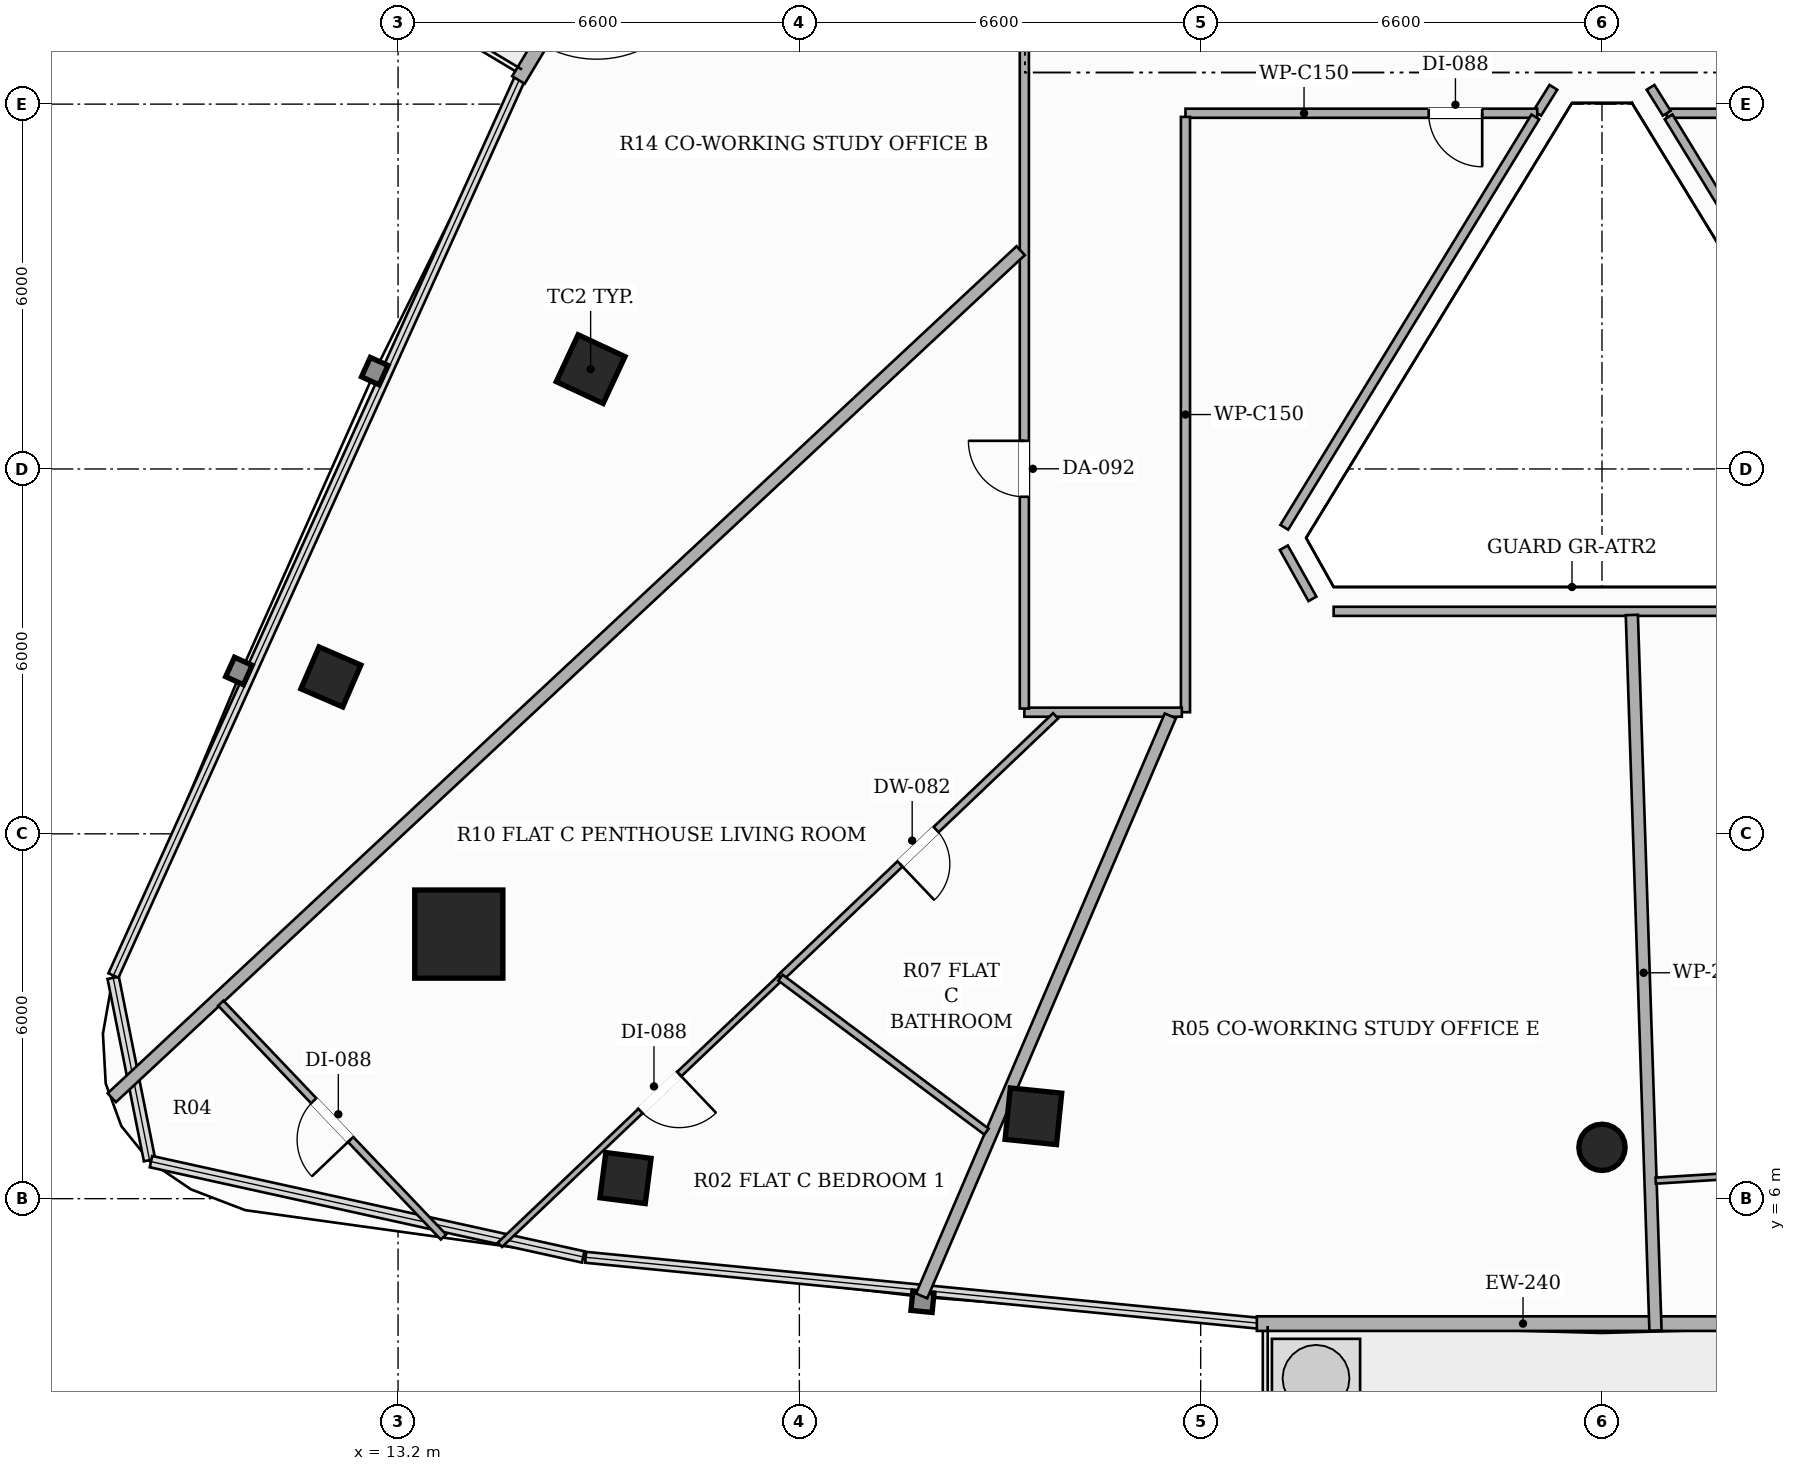
"""IFC4 building model, lengths in metres.
Left out: names, types, materials, properties, quantities, classifications, styles, units other than length and angle.
Written with IfcOpenShell. Run it as: python <this file> out.ifc"""

import sys

from ifc_helpers import new_model, si_unit, direction, frame, frame_2d, origin, origin_2d, place, context, subcontext, project, spatial, rectangle, hollow_rectangle, hollow_circle, extrude, element, fill, save


model = new_model("IFC4")
c1 = context("Model", 3, precision=1e-05, world=origin(), true_north=direction((0.0, 1.0)))
c2 = subcontext(c1, "Body", "Model", "MODEL_VIEW")
j1 = project(units=[si_unit("LENGTHUNIT", "METRE"), si_unit("PLANEANGLEUNIT", "RADIAN")], contexts=[c1])
p1 = place(None, origin())
s1 = spatial("IfcSite", under=j1, at=p1, CompositionType="ELEMENT")
p2 = place(p1, origin())
s2 = spatial("IfcBuilding", under=s1, at=p2, CompositionType="ELEMENT")
p3 = place(p2, frame((0.0, 0.0, 170.45)))
s3 = spatial("IfcBuildingStorey", under=s2, at=p3, CompositionType="ELEMENT", Elevation=170.45)
p4 = place(p3, frame((14.199, 10.351, 0.0), z_axis=(0.0, 0.0, 1.0), x_axis=(1.0, 0.0, 0.0)))
e1 = element("IfcColumn", 1, at=p4, inside=s3, PredefinedType="COLUMN", context=c2, shape_type="SweptSolid", body=[
    extrude(hollow_rectangle(XDim=1.45, YDim=1.45, WallThickness=0.045, at=origin_2d()), origin(), (0.0, 0.0, 1.0), 3.3),
])
for number, where, z_axis, x_axis in (
    (2, (16.367, 19.642, 0.0), (0.0, 0.0, 1.0), (0.423, 0.906, 0.0)),
    (3, (23.649, 7.355, 0.0), (0.0, 0.0, 1.0), (-0.995, 0.101, 0.0)),
):
    element("IfcColumn", number, at=place(p3, frame(where, z_axis=z_axis, x_axis=x_axis)), inside=s3, PredefinedType="COLUMN", context=c2, shape_type="SweptSolid", body=[
        extrude(hollow_rectangle(XDim=0.85, YDim=0.85, WallThickness=0.028, at=origin_2d()), origin(), (0.0, 0.0, 1.0), 3.3),
    ])
p5 = place(p3, frame((33.0, 6.844, 0.0), z_axis=(0.0, 0.0, 1.0), x_axis=(1.0, 0.0, 0.0)))
e4 = element("IfcColumn", 4, at=p5, inside=s3, PredefinedType="COLUMN", context=c2, shape_type="SweptSolid", body=[
    extrude(hollow_circle(Radius=0.381, WallThickness=0.022, at=origin_2d()), origin(), (0.0, 0.0, 1.0), 3.3),
])
for number, where, z_axis, x_axis in (
    (5, (12.095, 14.58, 0.0), (0.0, 0.0, 1.0), (0.397, 0.918, 0.0)),
    (6, (16.941, 6.339, 0.0), (0.0, 0.0, 1.0), (-0.992, 0.127, 0.0)),
):
    element("IfcColumn", number, at=place(p3, frame(where, z_axis=z_axis, x_axis=x_axis)), inside=s3, PredefinedType="COLUMN", context=c2, shape_type="SweptSolid", body=[
        extrude(hollow_rectangle(XDim=0.75, YDim=0.75, WallThickness=0.025, at=origin_2d()), origin(), (0.0, 0.0, 1.0), 3.3),
    ])
p6 = place(p3, frame((20.826, 33.811, 0.0), z_axis=(0.0, 0.0, 1.0), x_axis=(-0.514332213488, -0.857591029669, 0.0)))
e7 = element("IfcWall", 7, at=p6, inside=s3, PredefinedType="SOLIDWALL", context=c2, shape_type="SweptSolid", body=[
    extrude(rectangle(XDim=10.977, YDim=0.24, at=frame_2d((5.489, 0.0))), origin(), (0.0, 0.0, 1.0), 2.624),
])
p7 = place(p6, frame((8.48, 0.0, 0.0)))
e8 = element("IfcOpeningElement", 8, at=p7, cuts=e7, PredefinedType="OPENING", context=c2, shape_type="SweptSolid", body=[
    extrude(rectangle(XDim=1.8, YDim=2.2, at=frame_2d((0.9, 1.1))), frame((0.0, 0.13, 0.0), z_axis=(0.0, -1.0, 0.0), x_axis=(1.0, 0.0, 0.0)), (0.0, 0.0, 1.0), 0.26),
])
p8 = place(p3, frame((27.324, 3.945, 0.0), z_axis=(0.0, 0.0, 1.0), x_axis=(1.0, 0.0, 0.0)))
e9 = element("IfcWall", 9, at=p8, inside=s3, PredefinedType="SOLIDWALL", context=c2, shape_type="SweptSolid", body=[
    extrude(rectangle(XDim=11.352, YDim=0.24, at=frame_2d((5.676, 0.0))), origin(), (0.0, 0.0, 1.0), 2.624),
])
p9 = place(p8, frame((8.855, 0.0, 0.0)))
e10 = element("IfcOpeningElement", 10, at=p9, cuts=e9, PredefinedType="OPENING", context=c2, shape_type="SweptSolid", body=[
    extrude(rectangle(XDim=1.8, YDim=2.2, at=frame_2d((0.9, 1.1))), frame((0.0, 0.13, 0.0), z_axis=(0.0, -1.0, 0.0), x_axis=(1.0, 0.0, 0.0)), (0.0, 0.0, 1.0), 0.26),
])
p10 = place(p3, frame((32.201, 24.276, 0.0), z_axis=(0.0, 0.0, 1.0), x_axis=(-0.529649150849, -0.84821682193, 0.0)))
e11 = element("IfcWall", 11, at=p10, inside=s3, PredefinedType="PARTITIONING", context=c2, shape_type="SweptSolid", body=[
    extrude(rectangle(XDim=0.502, YDim=0.15, at=frame_2d((0.251, 0.0))), origin(), (0.0, 0.0, 1.0), 3.06),
])
p11 = place(p3, frame((31.935, 23.85, 0.0), z_axis=(0.0, 0.0, 1.0), x_axis=(-1.0, 0.0, 0.0)))
e12 = element("IfcWall", 12, at=p11, inside=s3, PredefinedType="PARTITIONING", context=c2, shape_type="SweptSolid", body=[
    extrude(rectangle(XDim=5.785, YDim=0.15, at=frame_2d((2.893, 0.0))), origin(), (0.0, 0.0, 1.0), 2.721),
])
p12 = place(p11, frame((0.905, 0.0, 0.0)))
e13 = element("IfcOpeningElement", 13, at=p12, cuts=e12, PredefinedType="OPENING", context=c2, shape_type="SweptSolid", body=[
    extrude(rectangle(XDim=0.88, YDim=2.1, at=frame_2d((0.44, 1.05))), frame((0.0, 0.085, 0.0), z_axis=(0.0, -1.0, 0.0), x_axis=(1.0, 0.0, 0.0)), (0.0, 0.0, 1.0), 0.17),
])
p13 = place(p3, frame((26.15, 23.79, 0.0), z_axis=(0.0, 0.0, 1.0), x_axis=(0.0, -1.0, 0.0)))
e14 = element("IfcWall", 14, at=p13, inside=s3, PredefinedType="PARTITIONING", context=c2, shape_type="SweptSolid", body=[
    extrude(rectangle(XDim=9.79, YDim=0.15, at=frame_2d((4.895, 0.0))), origin(), (0.0, 0.0, 1.0), 2.721),
])
p14 = place(p3, frame((26.09, 14.0, 0.0), z_axis=(0.0, 0.0, 1.0), x_axis=(-1.0, 0.0, 0.0)))
e15 = element("IfcWall", 15, at=p14, inside=s3, PredefinedType="PARTITIONING", context=c2, shape_type="SweptSolid", body=[
    extrude(rectangle(XDim=2.59, YDim=0.15, at=frame_2d((1.295, 0.0))), origin(), (0.0, 0.0, 1.0), 2.721),
])
p15 = place(p3, frame((23.5, 14.06, 0.0), z_axis=(0.0, 0.0, 1.0), x_axis=(0.0, 1.0, 0.0)))
e16 = element("IfcWall", 16, at=p15, inside=s3, PredefinedType="PARTITIONING", context=c2, shape_type="SweptSolid", body=[
    extrude(rectangle(XDim=23.457, YDim=0.15, at=frame_2d((11.729, 0.0))), origin(), (0.0, 0.0, 1.0), 2.413),
])
p16 = place(p15, frame((14.586, 0.0, 0.0)))
e17 = element("IfcOpeningElement", 17, at=p16, cuts=e16, PredefinedType="OPENING", context=c2, shape_type="SweptSolid", body=[
    extrude(rectangle(XDim=0.88, YDim=2.1, at=frame_2d((0.44, 1.05))), frame((0.0, 0.085, 0.0), z_axis=(0.0, -1.0, 0.0), x_axis=(1.0, 0.0, 0.0)), (0.0, 0.0, 1.0), 0.17),
])
p17 = place(p15, frame((3.483, 0.0, 0.0)))
e18 = element("IfcOpeningElement", 18, at=p17, cuts=e16, PredefinedType="OPENING", context=c2, shape_type="SweptSolid", body=[
    extrude(rectangle(XDim=0.92, YDim=2.15, at=frame_2d((0.46, 1.075))), frame((0.0, 0.085, 0.0), z_axis=(0.0, -1.0, 0.0), x_axis=(1.0, 0.0, 0.0)), (0.0, 0.0, 1.0), 0.17),
])
p18 = place(p3, frame((42.29, 23.85, 0.0), z_axis=(0.0, 0.0, 1.0), x_axis=(-1.0, 0.0, 0.0)))
e19 = element("IfcWall", 19, at=p18, inside=s3, PredefinedType="PARTITIONING", context=c2, shape_type="SweptSolid", body=[
    extrude(rectangle(XDim=8.225, YDim=0.15, at=frame_2d((4.113, 0.0))), origin(), (0.0, 0.0, 1.0), 2.492),
])
p19 = place(p18, frame((5.493, 0.0, 0.0)))
e20 = element("IfcOpeningElement", 20, at=p19, cuts=e19, PredefinedType="OPENING", context=c2, shape_type="SweptSolid", body=[
    extrude(rectangle(XDim=0.92, YDim=2.15, at=frame_2d((0.46, 1.075))), frame((0.0, 0.085, 0.0), z_axis=(0.0, -1.0, 0.0), x_axis=(1.0, 0.0, 0.0)), (0.0, 0.0, 1.0), 0.17),
])
p20 = place(p18, frame((2.43, 0.0, 0.0)))
e21 = element("IfcOpeningElement", 21, at=p20, cuts=e19, PredefinedType="OPENING", context=c2, shape_type="SweptSolid", body=[
    extrude(rectangle(XDim=0.82, YDim=2.1, at=frame_2d((0.41, 1.05))), frame((0.0, 0.085, 0.0), z_axis=(0.0, -1.0, 0.0), x_axis=(1.0, 0.0, 0.0)), (0.0, 0.0, 1.0), 0.17),
])
p21 = place(p18, frame((0.14, 0.0, 0.0)))
e22 = element("IfcOpeningElement", 22, at=p21, cuts=e19, PredefinedType="OPENING", context=c2, shape_type="SweptSolid", body=[
    extrude(rectangle(XDim=0.88, YDim=2.1, at=frame_2d((0.44, 1.05))), frame((0.0, 0.085, 0.0), z_axis=(0.0, -1.0, 0.0), x_axis=(1.0, 0.0, 0.0)), (0.0, 0.0, 1.0), 0.17),
])
p22 = place(p3, frame((34.065, 23.85, 0.0), z_axis=(0.0, 0.0, 1.0), x_axis=(-0.529649150849, 0.84821682193, 0.0)))
e23 = element("IfcWall", 23, at=p22, inside=s3, PredefinedType="PARTITIONING", context=c2, shape_type="SweptSolid", body=[
    extrude(rectangle(XDim=0.502, YDim=0.15, at=frame_2d((0.251, 0.0))), origin(), (0.0, 0.0, 1.0), 3.06),
])
p23 = place(p3, frame((34.096, 23.79, 0.0), z_axis=(0.0, 0.0, 1.0), x_axis=(0.521886794995, -0.853014755564, 0.0)))
e24 = element("IfcWall", 24, at=p23, inside=s3, PredefinedType="PARTITIONING", context=c2, shape_type="SweptSolid", body=[
    extrude(rectangle(XDim=7.912, YDim=0.15, at=frame_2d((3.956, 0.0))), origin(), (0.0, 0.0, 1.0), 2.721),
])
p24 = place(p3, frame((37.413, 15.659, 0.0), z_axis=(0.0, 0.0, 1.0), x_axis=(-1.0, 0.0, 0.0)))
e25 = element("IfcWall", 25, at=p24, inside=s3, PredefinedType="PARTITIONING", context=c2, shape_type="SweptSolid", body=[
    extrude(rectangle(XDim=8.826, YDim=0.15, at=frame_2d((4.413, 0.0))), origin(), (0.0, 0.0, 1.0), 2.721),
])
p25 = place(p3, frame((28.238, 15.864, 0.0), z_axis=(0.0, 0.0, 1.0), x_axis=(-0.48779296069, 0.872959350429, 0.0)))
e26 = element("IfcWall", 26, at=p25, inside=s3, PredefinedType="PARTITIONING", context=c2, shape_type="SweptSolid", body=[
    extrude(rectangle(XDim=0.963, YDim=0.15, at=frame_2d((0.482, 0.0))), origin(), (0.0, 0.0, 1.0), 3.06),
])
p26 = place(p3, frame((27.775, 17.041, 0.0), z_axis=(0.0, 0.0, 1.0), x_axis=(0.521886794995, 0.853014755564, 0.0)))
e27 = element("IfcWall", 27, at=p26, inside=s3, PredefinedType="PARTITIONING", context=c2, shape_type="SweptSolid", body=[
    extrude(rectangle(XDim=7.912, YDim=0.15, at=frame_2d((3.956, 0.0))), origin(), (0.0, 0.0, 1.0), 2.721),
])
p27 = place(p3, frame((33.88, 3.831, 0.0), z_axis=(0.0, 0.0, 1.0), x_axis=(-0.033030388285, 0.999454347857, 0.0)))
e28 = element("IfcWall", 28, at=p27, inside=s3, PredefinedType="PARTITIONING", context=c2, shape_type="SweptSolid", body=[
    extrude(rectangle(XDim=11.774, YDim=0.2, at=frame_2d((5.887, 0.0))), origin(), (0.0, 0.0, 1.0), 2.413),
])
p28 = place(p3, frame((23.44, 21.59, 0.0), z_axis=(0.0, 0.0, 1.0), x_axis=(-0.731574776166, -0.681761209572, 0.0)))
e29 = element("IfcWall", 29, at=p28, inside=s3, PredefinedType="PARTITIONING", context=c2, shape_type="SweptSolid", body=[
    extrude(rectangle(XDim=20.433, YDim=0.2, at=frame_2d((10.216, 0.0))), origin(), (0.0, 0.0, 1.0), 2.413),
])
p29 = place(p3, frame((25.901, 13.94, 0.0), z_axis=(0.0, 0.0, 1.0), x_axis=(-0.394055564824, -0.919086618242, 0.0)))
e30 = element("IfcWall", 30, at=p29, inside=s3, PredefinedType="PARTITIONING", context=c2, shape_type="SweptSolid", body=[
    extrude(rectangle(XDim=10.379, YDim=0.2, at=frame_2d((5.189, 0.0))), origin(), (0.0, 0.0, 1.0), 2.413),
])
p30 = place(p3, frame((41.446, 6.77, 0.0), z_axis=(0.0, 0.0, 1.0), x_axis=(-0.998040272182, -0.062574875979, 0.0)))
e31 = element("IfcWall", 31, at=p30, inside=s3, PredefinedType="PARTITIONING", context=c2, shape_type="SweptSolid", body=[
    extrude(rectangle(XDim=7.577, YDim=0.1, at=frame_2d((3.789, 0.0))), origin(), (0.0, 0.0, 1.0), 3.06),
])
p31 = place(p30, frame((3.378, 0.0, 0.0)))
e32 = element("IfcOpeningElement", 32, at=p31, cuts=e31, PredefinedType="OPENING", context=c2, shape_type="SweptSolid", body=[
    extrude(rectangle(XDim=0.82, YDim=2.1, at=frame_2d((0.41, 1.05))), frame((0.0, 0.06, 0.0), z_axis=(0.0, -1.0, 0.0), x_axis=(1.0, 0.0, 0.0)), (0.0, 0.0, 1.0), 0.12),
])
p32 = place(p3, frame((24.014, 13.94, 0.0), z_axis=(0.0, 0.0, 1.0), x_axis=(-0.724345202964, -0.68943747138, 0.0)))
e33 = element("IfcWall", 33, at=p32, inside=s3, PredefinedType="PARTITIONING", context=c2, shape_type="SweptSolid", body=[
    extrude(rectangle(XDim=6.246, YDim=0.12, at=frame_2d((3.123, 0.0))), origin(), (0.0, 0.0, 1.0), 2.721),
])
p33 = place(p32, frame((2.713, 0.0, 0.0)))
e34 = element("IfcOpeningElement", 34, at=p33, cuts=e33, PredefinedType="OPENING", context=c2, shape_type="SweptSolid", body=[
    extrude(rectangle(XDim=0.82, YDim=2.1, at=frame_2d((0.41, 1.05))), frame((0.0, 0.07, 0.0), z_axis=(0.0, -1.0, 0.0), x_axis=(1.0, 0.0, 0.0)), (0.0, 0.0, 1.0), 0.14),
])
p34 = place(p3, frame((13.947, 5.369, 0.0), z_axis=(0.0, 0.0, 1.0), x_axis=(-0.689563334415, 0.724225384691, 0.0)))
e35 = element("IfcWall", 35, at=p34, inside=s3, PredefinedType="PARTITIONING", context=c2, shape_type="SweptSolid", body=[
    extrude(rectangle(XDim=5.311, YDim=0.12, at=frame_2d((2.655, 0.0))), origin(), (0.0, 0.0, 1.0), 3.06),
])
p35 = place(p34, frame((2.215, 0.0, 0.0)))
e36 = element("IfcOpeningElement", 36, at=p35, cuts=e35, PredefinedType="OPENING", context=c2, shape_type="SweptSolid", body=[
    extrude(rectangle(XDim=0.88, YDim=2.1, at=frame_2d((0.44, 1.05))), frame((0.0, 0.07, 0.0), z_axis=(0.0, -1.0, 0.0), x_axis=(1.0, 0.0, 0.0)), (0.0, 0.0, 1.0), 0.14),
])
p36 = place(p3, frame((19.49, 9.634, 0.0), z_axis=(0.0, 0.0, 1.0), x_axis=(-0.724311078703, -0.68947332165, 0.0)))
e37 = element("IfcWall", 37, at=p36, inside=s3, PredefinedType="PARTITIONING", context=c2, shape_type="SweptSolid", body=[
    extrude(rectangle(XDim=6.37, YDim=0.1, at=frame_2d((3.185, 0.0))), origin(), (0.0, 0.0, 1.0), 2.413),
])
p37 = place(p36, frame((2.3, 0.0, 0.0)))
e38 = element("IfcOpeningElement", 38, at=p37, cuts=e37, PredefinedType="OPENING", context=c2, shape_type="SweptSolid", body=[
    extrude(rectangle(XDim=0.88, YDim=2.1, at=frame_2d((0.44, 1.05))), frame((0.0, 0.06, 0.0), z_axis=(0.0, -1.0, 0.0), x_axis=(1.0, 0.0, 0.0)), (0.0, 0.0, 1.0), 0.12),
])
p38 = place(p3, frame((22.877, 7.103, 0.0), z_axis=(0.0, 0.0, 1.0), x_axis=(-0.801045056039, 0.598604057951, 0.0)))
e39 = element("IfcWall", 39, at=p38, inside=s3, PredefinedType="PARTITIONING", context=c2, shape_type="SweptSolid", body=[
    extrude(rectangle(XDim=4.228, YDim=0.12, at=frame_2d((2.114, 0.0))), origin(), (0.0, 0.0, 1.0), 2.413),
])
p39 = place(p17, origin())
e40 = element("IfcDoor", 40, at=p39, inside=s3, OperationType="SINGLE_SWING_RIGHT", PredefinedType="DOOR", context=c2, shape_type="SweptSolid", body=[
    extrude(rectangle(XDim=0.92, YDim=2.15, at=frame_2d((0.46, 1.075))), frame((0.0, 0.025, 0.0), z_axis=(0.0, -1.0, 0.0), x_axis=(1.0, 0.0, 0.0)), (0.0, 0.0, 1.0), 0.05),
])
fill(e18, e40)
p40 = place(p33, origin())
e41 = element("IfcDoor", 41, at=p40, inside=s3, OperationType="SINGLE_SWING_RIGHT", PredefinedType="DOOR", context=c2, shape_type="SweptSolid", body=[
    extrude(rectangle(XDim=0.82, YDim=2.1, at=frame_2d((0.41, 1.05))), frame((0.0, 0.025, 0.0), z_axis=(0.0, -1.0, 0.0), x_axis=(1.0, 0.0, 0.0)), (0.0, 0.0, 1.0), 0.05),
])
fill(e34, e41)
p41 = place(p35, origin())
e42 = element("IfcDoor", 42, at=p41, inside=s3, OperationType="SINGLE_SWING_LEFT", PredefinedType="DOOR", context=c2, shape_type="SweptSolid", body=[
    extrude(rectangle(XDim=0.88, YDim=2.1, at=frame_2d((0.44, 1.05))), frame((0.0, 0.025, 0.0), z_axis=(0.0, -1.0, 0.0), x_axis=(1.0, 0.0, 0.0)), (0.0, 0.0, 1.0), 0.05),
])
fill(e36, e42)
p42 = place(p37, origin())
e43 = element("IfcDoor", 43, at=p42, inside=s3, OperationType="SINGLE_SWING_LEFT", PredefinedType="DOOR", context=c2, shape_type="SweptSolid", body=[
    extrude(rectangle(XDim=0.88, YDim=2.1, at=frame_2d((0.44, 1.05))), frame((0.0, 0.025, 0.0), z_axis=(0.0, -1.0, 0.0), x_axis=(1.0, 0.0, 0.0)), (0.0, 0.0, 1.0), 0.05),
])
fill(e38, e43)
p43 = place(p12, origin())
e44 = element("IfcDoor", 44, at=p43, inside=s3, OperationType="SINGLE_SWING_LEFT", PredefinedType="DOOR", context=c2, shape_type="SweptSolid", body=[
    extrude(rectangle(XDim=0.88, YDim=2.1, at=frame_2d((0.44, 1.05))), frame((0.0, 0.025, 0.0), z_axis=(0.0, -1.0, 0.0), x_axis=(1.0, 0.0, 0.0)), (0.0, 0.0, 1.0), 0.05),
])
fill(e13, e44)
save(model, sys.argv[1])
